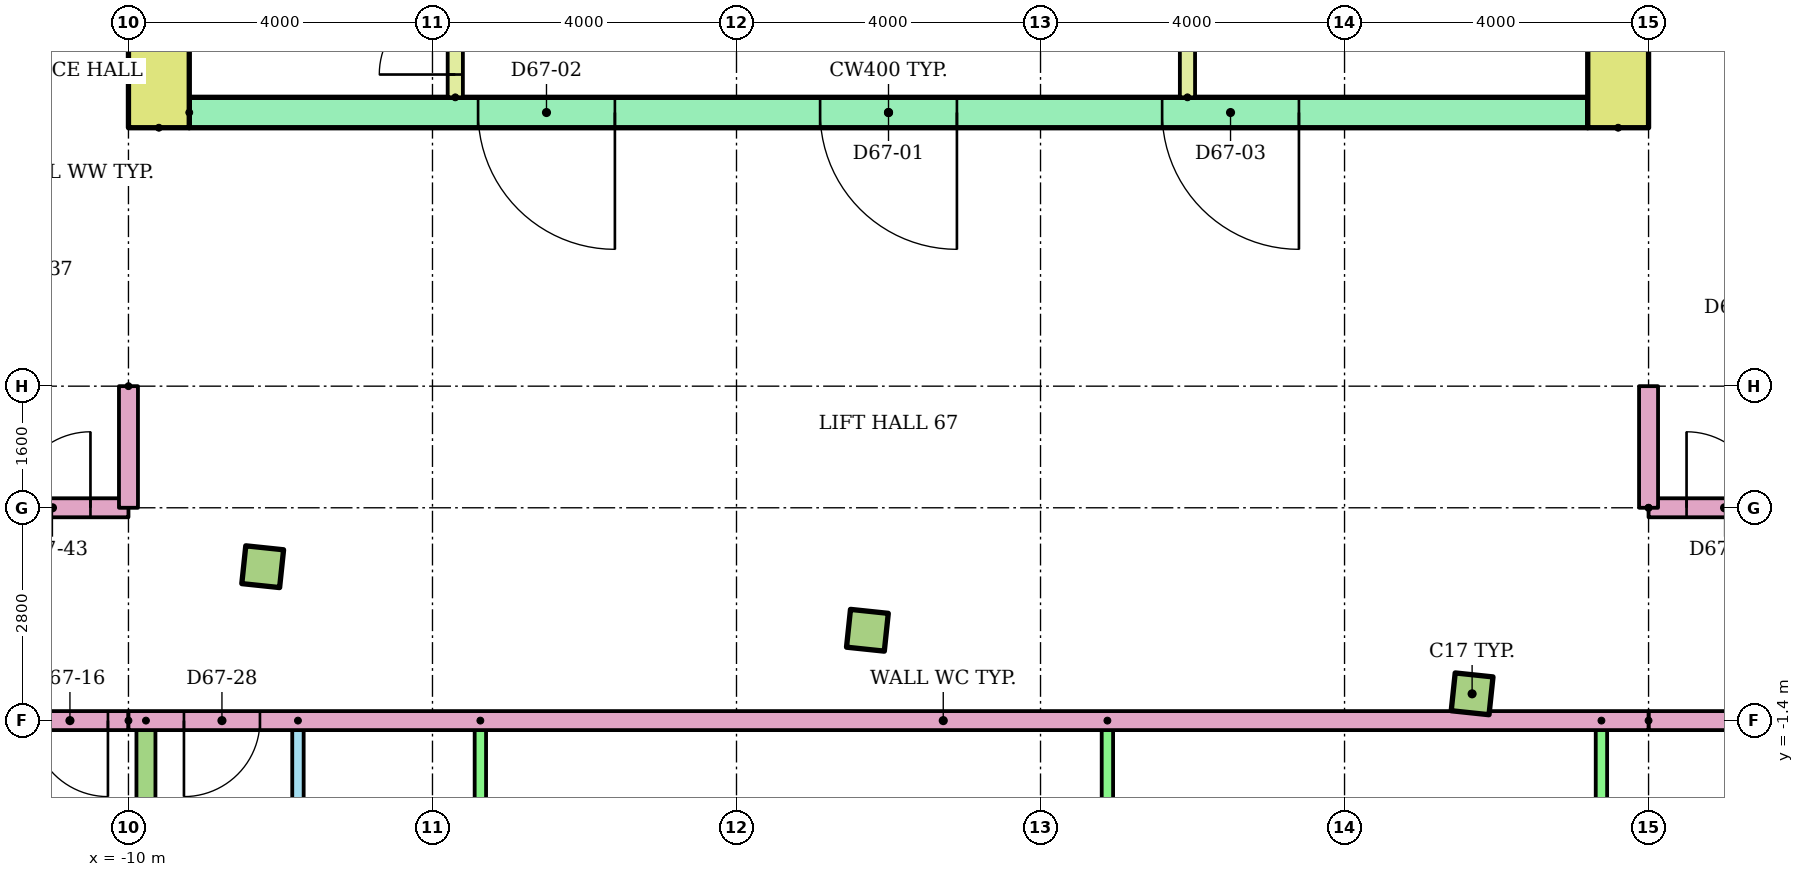
"""IFC4 building model, lengths in metres.
Left out: names, types, materials, properties, quantities, classifications, styles, units other than length and angle.
Written with IfcOpenShell. Run it as: python <this file> out.ifc"""

import sys

from ifc_helpers import new_model, si_unit, direction, frame, frame_2d, origin, origin_2d, place, context, subcontext, project, spatial, rectangle, extrude, element, fill, save


model = new_model("IFC4")
c1 = context("Model", 3, precision=1e-05, world=origin(), true_north=direction((0.0, 1.0)))
c2 = subcontext(c1, "Body", "Model", "MODEL_VIEW")
j1 = project(units=[si_unit("LENGTHUNIT", "METRE"), si_unit("PLANEANGLEUNIT", "RADIAN")], contexts=[c1])
p1 = place(None, origin())
s1 = spatial("IfcSite", under=j1, at=p1, CompositionType="ELEMENT")
p2 = place(p1, origin())
s2 = spatial("IfcBuilding", under=s1, at=p2, CompositionType="ELEMENT")
p3 = place(p2, frame((0.0, 0.0, 259.5)))
s3 = spatial("IfcBuildingStorey", under=s2, at=p3, CompositionType="ELEMENT", Elevation=259.5)
for number, where, z_axis, x_axis in (
    (1, (-8.234, 0.625, 0.0), (0.0, 0.0, 1.0), (0.995, -0.105, 0.0)),
    (2, (-0.278, -0.211, 0.0), (0.0, 0.0, 1.0), (0.995, -0.105, 0.0)),
    (3, (7.678, -1.048, 0.0), (0.0, 0.0, 1.0), (0.995, -0.105, 0.0)),
):
    element("IfcColumn", number, at=place(p3, frame(where, z_axis=z_axis, x_axis=x_axis)), inside=s3, PredefinedType="COLUMN", context=c2, shape_type="SweptSolid", body=[
        extrude(rectangle(XDim=0.5, YDim=0.5, at=origin_2d()), origin(), (0.0, 0.0, 1.0), 3.2),
    ])
for number, where, z_axis, x_axis in (
    (4, (-9.6, 6.4, 0.0), (0.0, 0.0, 1.0), (0.0, 1.0, 0.0)),
    (5, (9.6, 6.4, 0.0), (0.0, 0.0, 1.0), (0.0, 1.0, 0.0)),
):
    element("IfcWall", number, at=place(p3, frame(where, z_axis=z_axis, x_axis=x_axis)), inside=s3, PredefinedType="SHEAR", context=c2, shape_type="SweptSolid", body=[
        extrude(rectangle(XDim=13.6, YDim=0.8, at=frame_2d((6.8, 0.0))), origin(), (0.0, 0.0, 1.0), 2.92),
    ])
p4 = place(p3, frame((-9.2, 6.6, 0.0)))
e6 = element("IfcWall", 6, at=p4, inside=s3, PredefinedType="SHEAR", context=c2, shape_type="SweptSolid", body=[
    extrude(rectangle(XDim=18.4, YDim=0.4, at=frame_2d((9.2, 0.0))), origin(), (0.0, 0.0, 1.0), 2.92),
])
p5 = place(p4, frame((8.3, 0.0, 0.0)))
e7 = element("IfcOpeningElement", 7, at=p5, cuts=e6, PredefinedType="OPENING", context=c2, shape_type="SweptSolid", body=[
    extrude(rectangle(XDim=1.8, YDim=2.1, at=frame_2d((0.9, 1.05))), frame((0.0, 0.21, 0.0), z_axis=(0.0, -1.0, 0.0), x_axis=(1.0, 0.0, 0.0)), (0.0, 0.0, 1.0), 0.42),
])
p6 = place(p4, frame((3.8, 0.0, 0.0)))
e8 = element("IfcOpeningElement", 8, at=p6, cuts=e6, PredefinedType="OPENING", context=c2, shape_type="SweptSolid", body=[
    extrude(rectangle(XDim=1.8, YDim=2.1, at=frame_2d((0.9, 1.05))), frame((0.0, 0.21, 0.0), z_axis=(0.0, -1.0, 0.0), x_axis=(1.0, 0.0, 0.0)), (0.0, 0.0, 1.0), 0.42),
])
p7 = place(p4, frame((12.8, 0.0, 0.0)))
e9 = element("IfcOpeningElement", 9, at=p7, cuts=e6, PredefinedType="OPENING", context=c2, shape_type="SweptSolid", body=[
    extrude(rectangle(XDim=1.8, YDim=2.1, at=frame_2d((0.9, 1.05))), frame((0.0, 0.21, 0.0), z_axis=(0.0, -1.0, 0.0), x_axis=(1.0, 0.0, 0.0)), (0.0, 0.0, 1.0), 0.42),
])
p8 = place(p3, frame((3.933, 6.8, 0.0), z_axis=(0.0, 0.0, 1.0), x_axis=(0.0, 1.0, 0.0)))
e10 = element("IfcWall", 10, at=p8, inside=s3, PredefinedType="PARTITIONING", context=c2, shape_type="SweptSolid", body=[
    extrude(rectangle(XDim=3.3, YDim=0.2, at=frame_2d((1.65, 0.0))), origin(), (0.0, 0.0, 1.0), 2.92),
])
p9 = place(p8, frame((1.1, 0.0, 0.0)))
e11 = element("IfcOpeningElement", 11, at=p9, cuts=e10, PredefinedType="OPENING", context=c2, shape_type="SweptSolid", body=[
    extrude(rectangle(XDim=1.1, YDim=2.1, at=frame_2d((0.55, 1.05))), frame((0.0, 0.11, 0.0), z_axis=(0.0, -1.0, 0.0), x_axis=(1.0, 0.0, 0.0)), (0.0, 0.0, 1.0), 0.22),
])
p10 = place(p3, frame((-5.7, 6.8, 0.0), z_axis=(0.0, 0.0, 1.0), x_axis=(0.0, 1.0, 0.0)))
e12 = element("IfcWall", 12, at=p10, inside=s3, PredefinedType="PARTITIONING", context=c2, shape_type="SweptSolid", body=[
    extrude(rectangle(XDim=1.6, YDim=0.2, at=frame_2d((0.8, 0.0))), origin(), (0.0, 0.0, 1.0), 2.92),
])
p11 = place(p10, frame((0.3, 0.0, 0.0)))
e13 = element("IfcOpeningElement", 13, at=p11, cuts=e12, PredefinedType="OPENING", context=c2, shape_type="SweptSolid", body=[
    extrude(rectangle(XDim=1.0, YDim=2.1, at=frame_2d((0.5, 1.05))), frame((0.0, 0.11, 0.0), z_axis=(0.0, -1.0, 0.0), x_axis=(1.0, 0.0, 0.0)), (0.0, 0.0, 1.0), 0.22),
])
p12 = place(p3, frame((-7.77, -1.4, 0.0), z_axis=(0.0, 0.0, 1.0), x_axis=(0.0, -1.0, 0.0)))
e14 = element("IfcWall", 14, at=p12, inside=s3, PredefinedType="PARTITIONING", context=c2, shape_type="SweptSolid", body=[
    extrude(rectangle(XDim=6.075, YDim=0.15, at=frame_2d((3.037, 0.0))), origin(), (0.0, 0.0, 1.0), 2.4),
])
p13 = place(p12, frame((1.175, 0.0, 0.0)))
e15 = element("IfcOpeningElement", 15, at=p13, cuts=e14, PredefinedType="OPENING", context=c2, shape_type="SweptSolid", body=[
    extrude(rectangle(XDim=0.9, YDim=2.1, at=frame_2d((0.45, 1.05))), frame((0.0, 0.085, 0.0), z_axis=(0.0, -1.0, 0.0), x_axis=(1.0, 0.0, 0.0)), (0.0, 0.0, 1.0), 0.17),
])
p14 = place(p12, frame((4.13, 0.0, 0.0)))
e16 = element("IfcOpeningElement", 16, at=p14, cuts=e14, PredefinedType="OPENING", context=c2, shape_type="SweptSolid", body=[
    extrude(rectangle(XDim=0.8, YDim=2.1, at=frame_2d((0.4, 1.05))), frame((0.0, 0.085, 0.0), z_axis=(0.0, -1.0, 0.0), x_axis=(1.0, 0.0, 0.0)), (0.0, 0.0, 1.0), 0.17),
])
for number, where, z_axis, x_axis in (
    (17, (-5.37, -1.4, 0.0), (0.0, 0.0, 1.0), (0.0, -1.0, 0.0)),
    (18, (2.88, -1.4, 0.0), (0.0, 0.0, 1.0), (0.0, -1.0, 0.0)),
    (19, (9.38, -1.4, 0.0), (0.0, 0.0, 1.0), (0.0, -1.0, 0.0)),
):
    element("IfcWall", number, at=place(p3, frame(where, z_axis=z_axis, x_axis=x_axis)), inside=s3, PredefinedType="PARTITIONING", context=c2, shape_type="SweptSolid", body=[
        extrude(rectangle(XDim=6.075, YDim=0.15, at=frame_2d((3.037, 0.0))), origin(), (0.0, 0.0, 1.0), 2.4),
    ])
p15 = place(p3, frame((-9.77, -1.4, 0.0), z_axis=(0.0, 0.0, 1.0), x_axis=(0.0, -1.0, 0.0)))
e20 = element("IfcWall", 20, at=p15, inside=s3, PredefinedType="PARTITIONING", context=c2, shape_type="SweptSolid", body=[
    extrude(rectangle(XDim=12.504, YDim=0.25, at=frame_2d((6.252, 0.0))), origin(), (0.0, 0.0, 1.0), 2.4),
])
p16 = place(p3, frame((-10.0, -1.4, 0.0), z_axis=(0.0, 0.0, 1.0), x_axis=(-1.0, 0.0, 0.0)))
e21 = element("IfcWall", 21, at=p16, inside=s3, PredefinedType="PARTITIONING", context=c2, shape_type="SweptSolid", body=[
    extrude(rectangle(XDim=13.56, YDim=0.25, at=frame_2d((6.78, 0.0))), origin(), (0.0, 0.0, 1.0), 2.4),
])
p17 = place(p16, frame((0.27, 0.0, 0.0)))
e22 = element("IfcOpeningElement", 22, at=p17, cuts=e21, PredefinedType="OPENING", context=c2, shape_type="SweptSolid", body=[
    extrude(rectangle(XDim=1.0, YDim=2.1, at=frame_2d((0.5, 1.05))), frame((0.0, 0.135, 0.0), z_axis=(0.0, -1.0, 0.0), x_axis=(1.0, 0.0, 0.0)), (0.0, 0.0, 1.0), 0.27),
])
p18 = place(p3, frame((25.0, -1.4, 0.0), z_axis=(0.0, 0.0, 1.0), x_axis=(-1.0, 0.0, 0.0)))
e23 = element("IfcWall", 23, at=p18, inside=s3, PredefinedType="PARTITIONING", context=c2, shape_type="SweptSolid", body=[
    extrude(rectangle(XDim=15.0, YDim=0.25, at=frame_2d((7.5, 0.0))), origin(), (0.0, 0.0, 1.0), 2.4),
])
p19 = place(p18, frame((9.658, 0.0, 0.0)))
e24 = element("IfcOpeningElement", 24, at=p19, cuts=e23, PredefinedType="OPENING", context=c2, shape_type="SweptSolid", body=[
    extrude(rectangle(XDim=0.9, YDim=2.1, at=frame_2d((0.45, 1.05))), frame((0.0, 0.135, 0.0), z_axis=(0.0, -1.0, 0.0), x_axis=(1.0, 0.0, 0.0)), (0.0, 0.0, 1.0), 0.27),
])
p20 = place(p3, frame((-23.265, 1.4, 0.0)))
e25 = element("IfcWall", 25, at=p20, inside=s3, PredefinedType="PARTITIONING", context=c2, shape_type="SweptSolid", body=[
    extrude(rectangle(XDim=13.265, YDim=0.25, at=frame_2d((6.633, 0.0))), origin(), (0.0, 0.0, 1.0), 2.4),
])
p21 = place(p20, frame((11.765, 0.0, 0.0)))
e26 = element("IfcOpeningElement", 26, at=p21, cuts=e25, PredefinedType="OPENING", context=c2, shape_type="SweptSolid", body=[
    extrude(rectangle(XDim=1.0, YDim=2.1, at=frame_2d((0.5, 1.05))), frame((0.0, 0.135, 0.0), z_axis=(0.0, -1.0, 0.0), x_axis=(1.0, 0.0, 0.0)), (0.0, 0.0, 1.0), 0.27),
])
p22 = place(p3, frame((10.0, 1.4, 0.0)))
e27 = element("IfcWall", 27, at=p22, inside=s3, PredefinedType="PARTITIONING", context=c2, shape_type="SweptSolid", body=[
    extrude(rectangle(XDim=15.0, YDim=0.25, at=frame_2d((7.5, 0.0))), origin(), (0.0, 0.0, 1.0), 2.4),
])
p23 = place(p22, frame((0.5, 0.0, 0.0)))
e28 = element("IfcOpeningElement", 28, at=p23, cuts=e27, PredefinedType="OPENING", context=c2, shape_type="SweptSolid", body=[
    extrude(rectangle(XDim=1.0, YDim=2.1, at=frame_2d((0.5, 1.05))), frame((0.0, 0.135, 0.0), z_axis=(0.0, -1.0, 0.0), x_axis=(1.0, 0.0, 0.0)), (0.0, 0.0, 1.0), 0.27),
])
p24 = place(p3, frame((10.0, -1.4, 0.0), z_axis=(0.0, 0.0, 1.0), x_axis=(-1.0, 0.0, 0.0)))
e29 = element("IfcWall", 29, at=p24, inside=s3, PredefinedType="PARTITIONING", context=c2, shape_type="SweptSolid", body=[
    extrude(rectangle(XDim=20.0, YDim=0.25, at=frame_2d((10.0, 0.0))), origin(), (0.0, 0.0, 1.0), 2.4),
])
p25 = place(p24, frame((18.27, 0.0, 0.0)))
e30 = element("IfcOpeningElement", 30, at=p25, cuts=e29, PredefinedType="OPENING", context=c2, shape_type="SweptSolid", body=[
    extrude(rectangle(XDim=1.0, YDim=2.1, at=frame_2d((0.5, 1.05))), frame((0.0, 0.135, 0.0), z_axis=(0.0, -1.0, 0.0), x_axis=(1.0, 0.0, 0.0)), (0.0, 0.0, 1.0), 0.27),
])
for number, where, z_axis, x_axis in (
    (31, (-10.0, 3.0, 0.0), (0.0, 0.0, 1.0), (0.0, -1.0, 0.0)),
    (32, (10.0, 1.4, 0.0), (0.0, 0.0, 1.0), (0.0, 1.0, 0.0)),
):
    element("IfcWall", number, at=place(p3, frame(where, z_axis=z_axis, x_axis=x_axis)), inside=s3, PredefinedType="PARTITIONING", context=c2, shape_type="SweptSolid", body=[
        extrude(rectangle(XDim=1.6, YDim=0.25, at=frame_2d((0.8, 0.0))), origin(), (0.0, 0.0, 1.0), 2.4),
    ])
p26 = place(p5, frame((1.8, 0.0, 0.0), z_axis=(0.0, 0.0, 1.0), x_axis=(-1.0, 0.0, 0.0)))
e33 = element("IfcDoor", 33, at=p26, inside=s3, OperationType="DOUBLE_DOOR_SINGLE_SWING", PredefinedType="DOOR", context=c2, shape_type="SweptSolid", body=[
    extrude(rectangle(XDim=1.8, YDim=2.1, at=frame_2d((0.9, 1.05))), frame((0.0, 0.025, 0.0), z_axis=(0.0, -1.0, 0.0), x_axis=(1.0, 0.0, 0.0)), (0.0, 0.0, 1.0), 0.05),
])
fill(e7, e33)
p27 = place(p6, frame((1.8, 0.0, 0.0), z_axis=(0.0, 0.0, 1.0), x_axis=(-1.0, 0.0, 0.0)))
e34 = element("IfcDoor", 34, at=p27, inside=s3, OperationType="DOUBLE_DOOR_SINGLE_SWING", PredefinedType="DOOR", context=c2, shape_type="SweptSolid", body=[
    extrude(rectangle(XDim=1.8, YDim=2.1, at=frame_2d((0.9, 1.05))), frame((0.0, 0.025, 0.0), z_axis=(0.0, -1.0, 0.0), x_axis=(1.0, 0.0, 0.0)), (0.0, 0.0, 1.0), 0.05),
])
fill(e8, e34)
p28 = place(p7, frame((1.8, 0.0, 0.0), z_axis=(0.0, 0.0, 1.0), x_axis=(-1.0, 0.0, 0.0)))
e35 = element("IfcDoor", 35, at=p28, inside=s3, OperationType="DOUBLE_DOOR_SINGLE_SWING", PredefinedType="DOOR", context=c2, shape_type="SweptSolid", body=[
    extrude(rectangle(XDim=1.8, YDim=2.1, at=frame_2d((0.9, 1.05))), frame((0.0, 0.025, 0.0), z_axis=(0.0, -1.0, 0.0), x_axis=(1.0, 0.0, 0.0)), (0.0, 0.0, 1.0), 0.05),
])
fill(e9, e35)
p29 = place(p11, origin())
e36 = element("IfcDoor", 36, at=p29, inside=s3, OperationType="SINGLE_SWING_LEFT", PredefinedType="DOOR", context=c2, shape_type="SweptSolid", body=[
    extrude(rectangle(XDim=1.0, YDim=2.1, at=frame_2d((0.5, 1.05))), frame((0.0, 0.025, 0.0), z_axis=(0.0, -1.0, 0.0), x_axis=(1.0, 0.0, 0.0)), (0.0, 0.0, 1.0), 0.05),
])
fill(e13, e36)
p30 = place(p17, origin())
e37 = element("IfcDoor", 37, at=p30, inside=s3, OperationType="SINGLE_SWING_LEFT", PredefinedType="DOOR", context=c2, shape_type="SweptSolid", body=[
    extrude(rectangle(XDim=1.0, YDim=2.1, at=frame_2d((0.5, 1.05))), frame((0.0, 0.025, 0.0), z_axis=(0.0, -1.0, 0.0), x_axis=(1.0, 0.0, 0.0)), (0.0, 0.0, 1.0), 0.05),
])
fill(e22, e37)
p31 = place(p25, origin())
e38 = element("IfcDoor", 38, at=p31, inside=s3, OperationType="SINGLE_SWING_RIGHT", PredefinedType="DOOR", context=c2, shape_type="SweptSolid", body=[
    extrude(rectangle(XDim=1.0, YDim=2.1, at=frame_2d((0.5, 1.05))), frame((0.0, 0.025, 0.0), z_axis=(0.0, -1.0, 0.0), x_axis=(1.0, 0.0, 0.0)), (0.0, 0.0, 1.0), 0.05),
])
fill(e30, e38)
p32 = place(p21, origin())
e39 = element("IfcDoor", 39, at=p32, inside=s3, OperationType="SINGLE_SWING_RIGHT", PredefinedType="DOOR", context=c2, shape_type="SweptSolid", body=[
    extrude(rectangle(XDim=1.0, YDim=2.1, at=frame_2d((0.5, 1.05))), frame((0.0, 0.025, 0.0), z_axis=(0.0, -1.0, 0.0), x_axis=(1.0, 0.0, 0.0)), (0.0, 0.0, 1.0), 0.05),
])
fill(e26, e39)
p33 = place(p23, origin())
e40 = element("IfcDoor", 40, at=p33, inside=s3, OperationType="SINGLE_SWING_LEFT", PredefinedType="DOOR", context=c2, shape_type="SweptSolid", body=[
    extrude(rectangle(XDim=1.0, YDim=2.1, at=frame_2d((0.5, 1.05))), frame((0.0, 0.025, 0.0), z_axis=(0.0, -1.0, 0.0), x_axis=(1.0, 0.0, 0.0)), (0.0, 0.0, 1.0), 0.05),
])
fill(e28, e40)
save(model, sys.argv[1])
